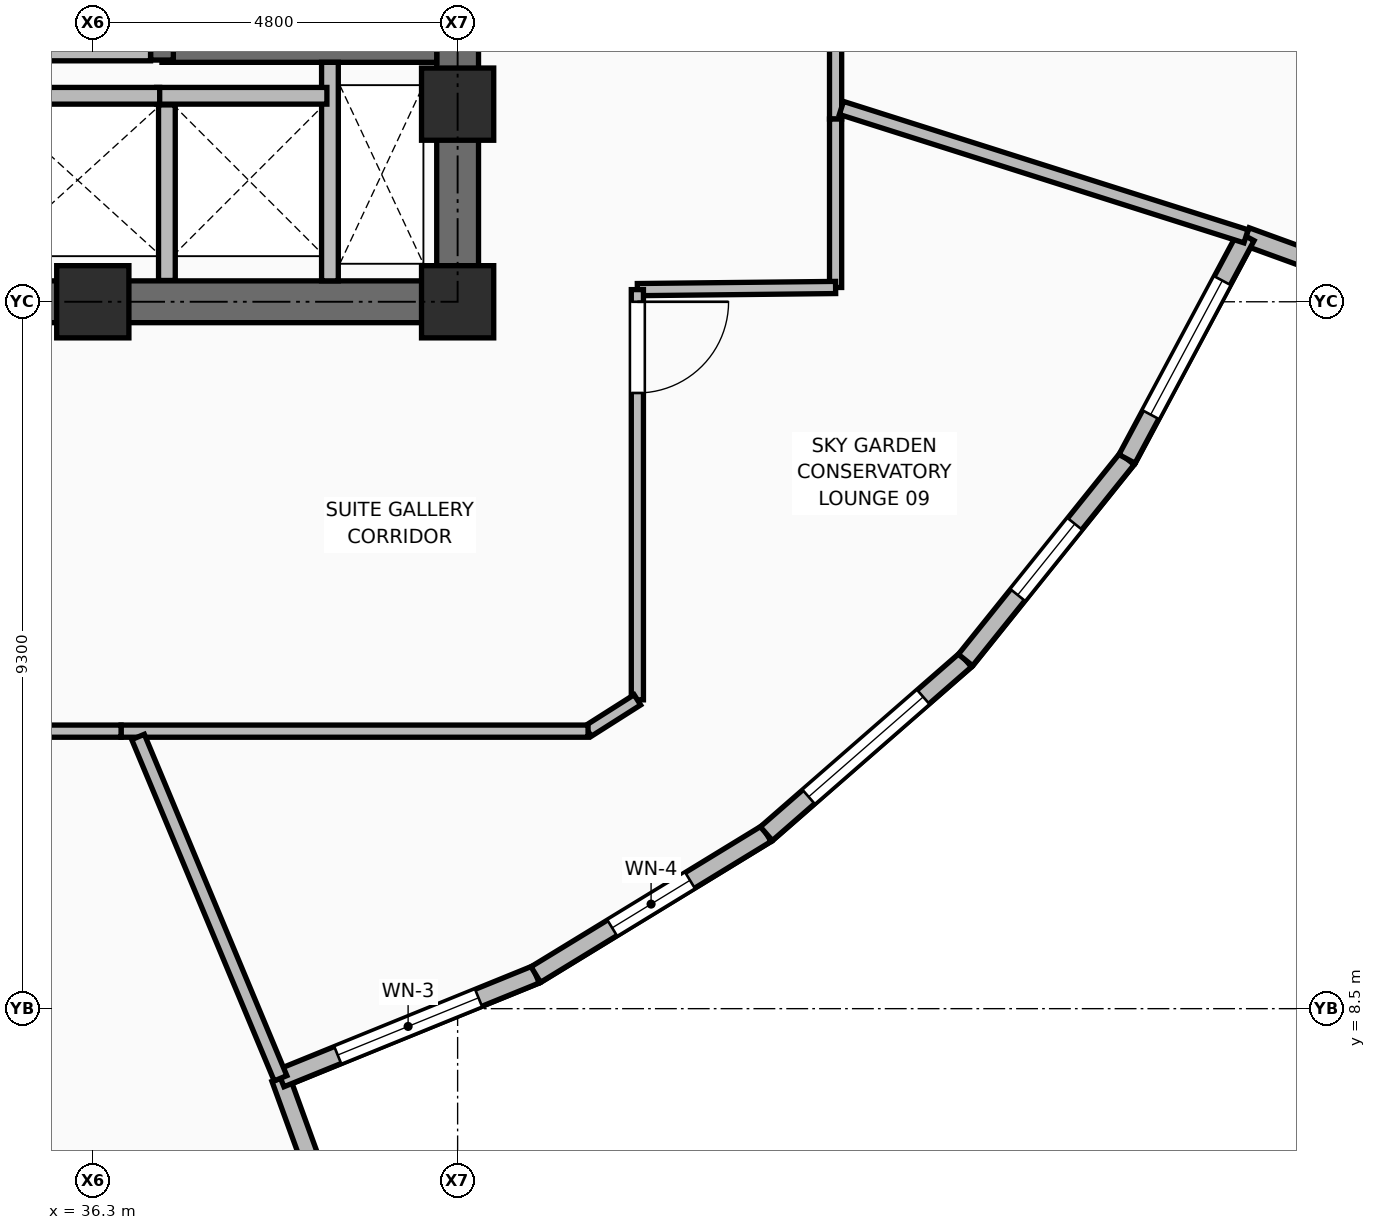
"""IFC4 building model, lengths in metres.
Left out: names, types, materials, properties, quantities, classifications, styles, units other than length and angle.
Written with IfcOpenShell. Run it as: python <this file> out.ifc"""

import sys

from ifc_helpers import new_model, si_unit, direction, frame, frame_2d, origin, origin_2d, place, context, subcontext, project, spatial, rectangle, extrude, element, fill, save


model = new_model("IFC4")
c1 = context("Model", 3, precision=1e-05, world=origin(), true_north=direction((0.0, 1.0)))
c2 = subcontext(c1, "Body", "Model", "MODEL_VIEW")
j1 = project(units=[si_unit("LENGTHUNIT", "METRE"), si_unit("PLANEANGLEUNIT", "RADIAN")], contexts=[c1])
p1 = place(None, origin())
s1 = spatial("IfcSite", under=j1, at=p1, CompositionType="ELEMENT")
p2 = place(p1, origin())
s2 = spatial("IfcBuilding", under=s1, at=p2, CompositionType="ELEMENT")
p3 = place(p2, frame((0.0, 0.0, 145.95)))
s3 = spatial("IfcBuildingStorey", under=s2, at=p3, CompositionType="ELEMENT", Elevation=145.95)
for number, where, z_axis, x_axis in (
    (1, (36.3, 17.8, 0.0), (0.0, 0.0, 1.0), (1.0, 0.0, 0.0)),
    (2, (41.1, 17.8, 0.0), (0.0, 0.0, 1.0), (1.0, 0.0, 0.0)),
    (3, (41.1, 20.4, 0.0), (0.0, 0.0, 1.0), (1.0, 0.0, 0.0)),
):
    element("IfcColumn", number, at=place(p3, frame(where, z_axis=z_axis, x_axis=x_axis)), inside=s3, PredefinedType="COLUMN", context=c2, shape_type="SweptSolid", body=[
        extrude(rectangle(XDim=0.95, YDim=0.95, at=origin_2d()), origin(), (0.0, 0.0, 1.0), 3.75),
    ])
p4 = place(p3, frame((37.275, 18.08, 0.0), z_axis=(0.0, 0.0, 1.0), x_axis=(0.0, 1.0, 0.0)))
e4 = element("IfcWall", 4, at=p4, inside=s3, PredefinedType="PARTITIONING", context=c2, shape_type="SweptSolid", body=[
    extrude(rectangle(XDim=2.31, YDim=0.22, at=frame_2d((1.155, 0.0))), origin(), (0.0, 0.0, 1.0), 3.545),
])
for number, where, z_axis, x_axis in (
    (5, (40.138, 3.825, 0.0), (0.0, 0.0, 1.0), (-0.342, 0.94, 0.0)),
    (6, (51.473, 18.661, 0.0), (0.0, 0.0, 1.0), (0.94, -0.342, 0.0)),
):
    element("IfcWall", number, at=place(p3, frame(where, z_axis=z_axis, x_axis=x_axis)), inside=s3, PredefinedType="SOLIDWALL", context=c2, shape_type="SweptSolid", body=[
        extrude(rectangle(XDim=4.0, YDim=0.24, at=frame_2d((2.0, 0.0))), origin(), (0.0, 0.0, 1.0), 3.57),
    ])
p5 = place(p3, frame((38.77, 7.584, 0.0), z_axis=(0.0, 0.0, 1.0), x_axis=(0.926385821436, 0.37657576906, 0.0)))
e7 = element("IfcWall", 7, at=p5, inside=s3, PredefinedType="SOLIDWALL", context=c2, shape_type="SweptSolid", body=[
    extrude(rectangle(XDim=3.625, YDim=0.24, at=frame_2d((1.812, 0.0))), origin(), (0.0, 0.0, 1.0), 3.57),
])
p6 = place(p5, frame((0.812, 0.0, 0.85)))
e8 = element("IfcOpeningElement", 8, at=p6, cuts=e7, PredefinedType="OPENING", context=c2, shape_type="SweptSolid", body=[
    extrude(rectangle(XDim=2.0, YDim=2.4, at=frame_2d((1.0, 1.2))), frame((0.0, 0.13, 0.0), z_axis=(0.0, -1.0, 0.0), x_axis=(1.0, 0.0, 0.0)), (0.0, 0.0, 1.0), 0.26),
])
p7 = place(p3, frame((42.128, 8.949, 0.0), z_axis=(0.0, 0.0, 1.0), x_axis=(0.853431175253, 0.521205553602, 0.0)))
e9 = element("IfcWall", 9, at=p7, inside=s3, PredefinedType="SOLIDWALL", context=c2, shape_type="SweptSolid", body=[
    extrude(rectangle(XDim=3.555, YDim=0.24, at=frame_2d((1.778, 0.0))), origin(), (0.0, 0.0, 1.0), 3.57),
])
p8 = place(p7, frame((1.178, 0.0, 0.85)))
e10 = element("IfcOpeningElement", 10, at=p8, cuts=e9, PredefinedType="OPENING", context=c2, shape_type="SweptSolid", body=[
    extrude(rectangle(XDim=1.2, YDim=1.8, at=frame_2d((0.6, 0.9))), frame((0.0, 0.13, 0.0), z_axis=(0.0, -1.0, 0.0), x_axis=(1.0, 0.0, 0.0)), (0.0, 0.0, 1.0), 0.26),
])
p9 = place(p3, frame((45.162, 10.802, 0.0), z_axis=(0.0, 0.0, 1.0), x_axis=(0.753641593814, 0.657285590952, 0.0)))
e11 = element("IfcWall", 11, at=p9, inside=s3, PredefinedType="SOLIDWALL", context=c2, shape_type="SweptSolid", body=[
    extrude(rectangle(XDim=3.476, YDim=0.24, at=frame_2d((1.738, 0.0))), origin(), (0.0, 0.0, 1.0), 3.57),
])
p10 = place(p9, frame((0.738, 0.0, 0.85)))
e12 = element("IfcOpeningElement", 12, at=p10, cuts=e11, PredefinedType="OPENING", context=c2, shape_type="SweptSolid", body=[
    extrude(rectangle(XDim=2.0, YDim=2.4, at=frame_2d((1.0, 1.2))), frame((0.0, 0.13, 0.0), z_axis=(0.0, -1.0, 0.0), x_axis=(1.0, 0.0, 0.0)), (0.0, 0.0, 1.0), 0.26),
])
p11 = place(p3, frame((47.782, 13.087, 0.0), z_axis=(0.0, 0.0, 1.0), x_axis=(0.626167832316, 0.779688300395, 0.0)))
e13 = element("IfcWall", 13, at=p11, inside=s3, PredefinedType="SOLIDWALL", context=c2, shape_type="SweptSolid", body=[
    extrude(rectangle(XDim=3.394, YDim=0.24, at=frame_2d((1.697, 0.0))), origin(), (0.0, 0.0, 1.0), 3.57),
])
p12 = place(p11, frame((1.097, 0.0, 0.85)))
e14 = element("IfcOpeningElement", 14, at=p12, cuts=e13, PredefinedType="OPENING", context=c2, shape_type="SweptSolid", body=[
    extrude(rectangle(XDim=1.2, YDim=1.8, at=frame_2d((0.6, 0.9))), frame((0.0, 0.13, 0.0), z_axis=(0.0, -1.0, 0.0), x_axis=(1.0, 0.0, 0.0)), (0.0, 0.0, 1.0), 0.26),
])
p13 = place(p3, frame((49.907, 15.733, 0.0), z_axis=(0.0, 0.0, 1.0), x_axis=(0.4716030563, 0.88181095326, 0.0)))
e15 = element("IfcWall", 15, at=p13, inside=s3, PredefinedType="SOLIDWALL", context=c2, shape_type="SweptSolid", body=[
    extrude(rectangle(XDim=3.32, YDim=0.24, at=frame_2d((1.66, 0.0))), origin(), (0.0, 0.0, 1.0), 3.57),
])
p14 = place(p13, frame((0.66, 0.0, 0.85)))
e16 = element("IfcOpeningElement", 16, at=p14, cuts=e15, PredefinedType="OPENING", context=c2, shape_type="SweptSolid", body=[
    extrude(rectangle(XDim=2.0, YDim=2.4, at=frame_2d((1.0, 1.2))), frame((0.0, 0.13, 0.0), z_axis=(0.0, -1.0, 0.0), x_axis=(1.0, 0.0, 0.0)), (0.0, 0.0, 1.0), 0.26),
])
p15 = place(p3, frame((34.95, 17.8, 0.0), z_axis=(0.0, 0.0, 1.0), x_axis=(1.0, 0.0, 0.0)))
e17 = element("IfcWall", 17, at=p15, inside=s3, PredefinedType="SHEAR", context=c2, shape_type="SweptSolid", body=[
    extrude(rectangle(XDim=6.425, YDim=0.55, at=frame_2d((3.212, 0.0))), origin(), (0.0, 0.0, 1.0), 3.57),
])
p16 = place(p3, frame((41.1, 18.075, 0.0), z_axis=(0.0, 0.0, 1.0), x_axis=(0.0, 1.0, 0.0)))
e18 = element("IfcWall", 18, at=p16, inside=s3, PredefinedType="SHEAR", context=c2, shape_type="SweptSolid", body=[
    extrude(rectangle(XDim=14.1, YDim=0.55, at=frame_2d((7.05, 0.0))), origin(), (0.0, 0.0, 1.0), 3.57),
])
p17 = place(p16, frame((3.385, 0.0, 0.0)))
e19 = element("IfcOpeningElement", 19, at=p17, cuts=e18, PredefinedType="OPENING", context=c2, shape_type="SweptSolid", body=[
    extrude(rectangle(XDim=1.05, YDim=2.1, at=frame_2d((0.525, 1.05))), frame((0.0, 0.285, 0.0), z_axis=(0.0, -1.0, 0.0), x_axis=(1.0, 0.0, 0.0)), (0.0, 0.0, 1.0), 0.57),
])
p18 = place(p3, frame((37.21, 21.1, 0.0), z_axis=(0.0, 0.0, 1.0), x_axis=(1.0, 0.0, 0.0)))
e20 = element("IfcWall", 20, at=p18, inside=s3, PredefinedType="SHEAR", context=c2, shape_type="SweptSolid", body=[
    extrude(rectangle(XDim=3.615, YDim=0.3, at=frame_2d((1.808, 0.0))), origin(), (0.0, 0.0, 1.0), 3.57),
])
p19 = place(p3, frame((37.21, 20.98, 0.0), z_axis=(0.0, 0.0, 1.0), x_axis=(0.0, 1.0, 0.0)))
e21 = element("IfcWall", 21, at=p19, inside=s3, PredefinedType="SHEAR", context=c2, shape_type="SweptSolid", body=[
    extrude(rectangle(XDim=7.99, YDim=0.3, at=frame_2d((3.995, 0.0))), origin(), (0.0, 0.0, 1.0), 3.57),
])
p20 = place(p3, frame((39.42, 18.075, 0.0), z_axis=(0.0, 0.0, 1.0), x_axis=(0.0, 1.0, 0.0)))
e22 = element("IfcWall", 22, at=p20, inside=s3, PredefinedType="PARTITIONING", context=c2, shape_type="SweptSolid", body=[
    extrude(rectangle(XDim=2.875, YDim=0.22, at=frame_2d((1.438, 0.0))), origin(), (0.0, 0.0, 1.0), 3.55),
])
for number, where, z_axis, x_axis in (
    (23, (37.14, 20.51, 0.0), (0.0, 0.0, 1.0), (1.0, 0.0, 0.0)),
    (24, (34.94, 20.51, 0.0), (0.0, 0.0, 1.0), (1.0, 0.0, 0.0)),
):
    element("IfcWall", number, at=place(p3, frame(where, z_axis=z_axis, x_axis=x_axis)), inside=s3, PredefinedType="PARTITIONING", context=c2, shape_type="SweptSolid", body=[
        extrude(rectangle(XDim=2.24, YDim=0.22, at=frame_2d((1.12, 0.0))), origin(), (0.0, 0.0, 1.0), 3.55),
    ])
p21 = place(p3, frame((35.12, 21.08, 0.0), z_axis=(0.0, 0.0, 1.0), x_axis=(1.0, 0.0, 0.0)))
e25 = element("IfcWall", 25, at=p21, inside=s3, PredefinedType="PARTITIONING", context=c2, shape_type="SweptSolid", body=[
    extrude(rectangle(XDim=1.94, YDim=0.22, at=frame_2d((0.97, 0.0))), origin(), (0.0, 0.0, 1.0), 3.55),
])
p22 = place(p3, frame((46.073, 25.23, 0.0), z_axis=(0.0, 0.0, 1.0), x_axis=(0.0, -1.0, 0.0)))
e26 = element("IfcWall", 26, at=p22, inside=s3, PredefinedType="PARTITIONING", context=c2, shape_type="SweptSolid", body=[
    extrude(rectangle(XDim=5.026, YDim=0.16, at=frame_2d((2.513, 0.0))), origin(), (0.0, 0.0, 1.0), 3.006),
])
p23 = place(p22, frame((1.767, 0.0, 0.0)))
e27 = element("IfcOpeningElement", 27, at=p23, cuts=e26, PredefinedType="OPENING", context=c2, shape_type="SweptSolid", body=[
    extrude(rectangle(XDim=1.2, YDim=2.1, at=frame_2d((0.6, 1.05))), frame((0.0, 0.09, 0.0), z_axis=(0.0, -1.0, 0.0), x_axis=(1.0, 0.0, 0.0)), (0.0, 0.0, 1.0), 0.18),
])
p24 = place(p3, frame((46.073, 20.204, 0.0), z_axis=(0.0, 0.0, 1.0), x_axis=(0.0, -1.0, 0.0)))
e28 = element("IfcWall", 28, at=p24, inside=s3, PredefinedType="PARTITIONING", context=c2, shape_type="SweptSolid", body=[
    extrude(rectangle(XDim=2.216, YDim=0.16, at=frame_2d((1.108, 0.0))), origin(), (0.0, 0.0, 1.0), 3.55),
])
p25 = place(p3, frame((46.073, 17.988, 0.0), z_axis=(0.0, 0.0, 1.0), x_axis=(-0.99994205409, -0.010765150367, 0.0)))
e29 = element("IfcWall", 29, at=p25, inside=s3, PredefinedType="PARTITIONING", context=c2, shape_type="SweptSolid", body=[
    extrude(rectangle(XDim=2.608, YDim=0.16, at=frame_2d((1.304, 0.0))), origin(), (0.0, 0.0, 1.0), 3.55),
])
p26 = place(p3, frame((43.465, 17.96, 0.0), z_axis=(0.0, 0.0, 1.0), x_axis=(0.0, -1.0, 0.0)))
e30 = element("IfcWall", 30, at=p26, inside=s3, PredefinedType="PARTITIONING", context=c2, shape_type="SweptSolid", body=[
    extrude(rectangle(XDim=5.397, YDim=0.16, at=frame_2d((2.698, 0.0))), origin(), (0.0, 0.0, 1.0), 3.006),
])
p27 = place(p26, frame((0.16, 0.0, 0.0)))
e31 = element("IfcOpeningElement", 31, at=p27, cuts=e30, PredefinedType="OPENING", context=c2, shape_type="SweptSolid", body=[
    extrude(rectangle(XDim=1.2, YDim=2.1, at=frame_2d((0.6, 1.05))), frame((0.0, 0.09, 0.0), z_axis=(0.0, -1.0, 0.0), x_axis=(1.0, 0.0, 0.0)), (0.0, 0.0, 1.0), 0.18),
])
p28 = place(p3, frame((43.465, 12.563, 0.0), z_axis=(0.0, 0.0, 1.0), x_axis=(-0.844249301718, -0.535950666152, 0.0)))
e32 = element("IfcWall", 32, at=p28, inside=s3, PredefinedType="PARTITIONING", context=c2, shape_type="SweptSolid", body=[
    extrude(rectangle(XDim=0.769, YDim=0.16, at=frame_2d((0.385, 0.0))), origin(), (0.0, 0.0, 1.0), 3.55),
])
p29 = place(p3, frame((42.816, 12.151, 0.0), z_axis=(0.0, 0.0, 1.0), x_axis=(-1.0, 0.0, 0.0)))
e33 = element("IfcWall", 33, at=p29, inside=s3, PredefinedType="PARTITIONING", context=c2, shape_type="SweptSolid", body=[
    extrude(rectangle(XDim=6.144, YDim=0.16, at=frame_2d((3.072, 0.0))), origin(), (0.0, 0.0, 1.0), 3.006),
])
p30 = place(p3, frame((36.672, 12.151, 0.0), z_axis=(0.0, 0.0, 1.0), x_axis=(-1.0, 0.0, 0.0)))
e34 = element("IfcWall", 34, at=p30, inside=s3, PredefinedType="PARTITIONING", context=c2, shape_type="SweptSolid", body=[
    extrude(rectangle(XDim=10.913, YDim=0.16, at=frame_2d((5.457, 0.0))), origin(), (0.0, 0.0, 1.0), 3.006),
])
p31 = place(p30, frame((4.782, 0.0, 0.0)))
e35 = element("IfcOpeningElement", 35, at=p31, cuts=e34, PredefinedType="OPENING", context=c2, shape_type="SweptSolid", body=[
    extrude(rectangle(XDim=1.2, YDim=2.1, at=frame_2d((0.6, 1.05))), frame((0.0, 0.09, 0.0), z_axis=(0.0, -1.0, 0.0), x_axis=(1.0, 0.0, 0.0)), (0.0, 0.0, 1.0), 0.18),
])
p32 = place(p3, frame((36.895, 12.075, 0.0), z_axis=(0.0, 0.0, 1.0), x_axis=(0.385274270889, -0.922802111068, 0.0)))
e36 = element("IfcWall", 36, at=p32, inside=s3, PredefinedType="PARTITIONING", context=c2, shape_type="SweptSolid", body=[
    extrude(rectangle(XDim=4.867, YDim=0.18, at=frame_2d((2.433, 0.0))), origin(), (0.0, 0.0, 1.0), 3.55),
])
p33 = place(p3, frame((46.15, 20.35, 0.0), z_axis=(0.0, 0.0, 1.0), x_axis=(0.953156881586, -0.302476377732, 0.0)))
e37 = element("IfcWall", 37, at=p33, inside=s3, PredefinedType="PARTITIONING", context=c2, shape_type="SweptSolid", body=[
    extrude(rectangle(XDim=5.585, YDim=0.18, at=frame_2d((2.792, 0.0))), origin(), (0.0, 0.0, 1.0), 3.55),
])
p34 = place(p6, origin())
e38 = element("IfcWindow", 38, at=p34, inside=s3, PartitioningType="SINGLE_PANEL", PredefinedType="WINDOW", context=c2, shape_type="SweptSolid", body=[
    extrude(rectangle(XDim=2.0, YDim=2.4, at=frame_2d((1.0, 1.2))), frame((0.0, 0.03, 0.0), z_axis=(0.0, -1.0, 0.0), x_axis=(1.0, 0.0, 0.0)), (0.0, 0.0, 1.0), 0.06),
])
fill(e8, e38)
p35 = place(p8, origin())
e39 = element("IfcWindow", 39, at=p35, inside=s3, PartitioningType="SINGLE_PANEL", PredefinedType="WINDOW", context=c2, shape_type="SweptSolid", body=[
    extrude(rectangle(XDim=1.2, YDim=1.8, at=frame_2d((0.6, 0.9))), frame((0.0, 0.03, 0.0), z_axis=(0.0, -1.0, 0.0), x_axis=(1.0, 0.0, 0.0)), (0.0, 0.0, 1.0), 0.06),
])
fill(e10, e39)
p36 = place(p10, origin())
e40 = element("IfcWindow", 40, at=p36, inside=s3, PartitioningType="SINGLE_PANEL", PredefinedType="WINDOW", context=c2, shape_type="SweptSolid", body=[
    extrude(rectangle(XDim=2.0, YDim=2.4, at=frame_2d((1.0, 1.2))), frame((0.0, 0.03, 0.0), z_axis=(0.0, -1.0, 0.0), x_axis=(1.0, 0.0, 0.0)), (0.0, 0.0, 1.0), 0.06),
])
fill(e12, e40)
p37 = place(p12, origin())
e41 = element("IfcWindow", 41, at=p37, inside=s3, PartitioningType="SINGLE_PANEL", PredefinedType="WINDOW", context=c2, shape_type="SweptSolid", body=[
    extrude(rectangle(XDim=1.2, YDim=1.8, at=frame_2d((0.6, 0.9))), frame((0.0, 0.03, 0.0), z_axis=(0.0, -1.0, 0.0), x_axis=(1.0, 0.0, 0.0)), (0.0, 0.0, 1.0), 0.06),
])
fill(e14, e41)
p38 = place(p14, origin())
e42 = element("IfcWindow", 42, at=p38, inside=s3, PartitioningType="SINGLE_PANEL", PredefinedType="WINDOW", context=c2, shape_type="SweptSolid", body=[
    extrude(rectangle(XDim=2.0, YDim=2.4, at=frame_2d((1.0, 1.2))), frame((0.0, 0.03, 0.0), z_axis=(0.0, -1.0, 0.0), x_axis=(1.0, 0.0, 0.0)), (0.0, 0.0, 1.0), 0.06),
])
fill(e16, e42)
p39 = place(p27, origin())
e43 = element("IfcDoor", 43, at=p39, inside=s3, OperationType="SINGLE_SWING_LEFT", PredefinedType="DOOR", context=c2, shape_type="SweptSolid", body=[
    extrude(rectangle(XDim=1.2, YDim=2.1, at=frame_2d((0.6, 1.05))), frame((0.0, 0.025, 0.0), z_axis=(0.0, -1.0, 0.0), x_axis=(1.0, 0.0, 0.0)), (0.0, 0.0, 1.0), 0.05),
])
fill(e31, e43)
save(model, sys.argv[1])
